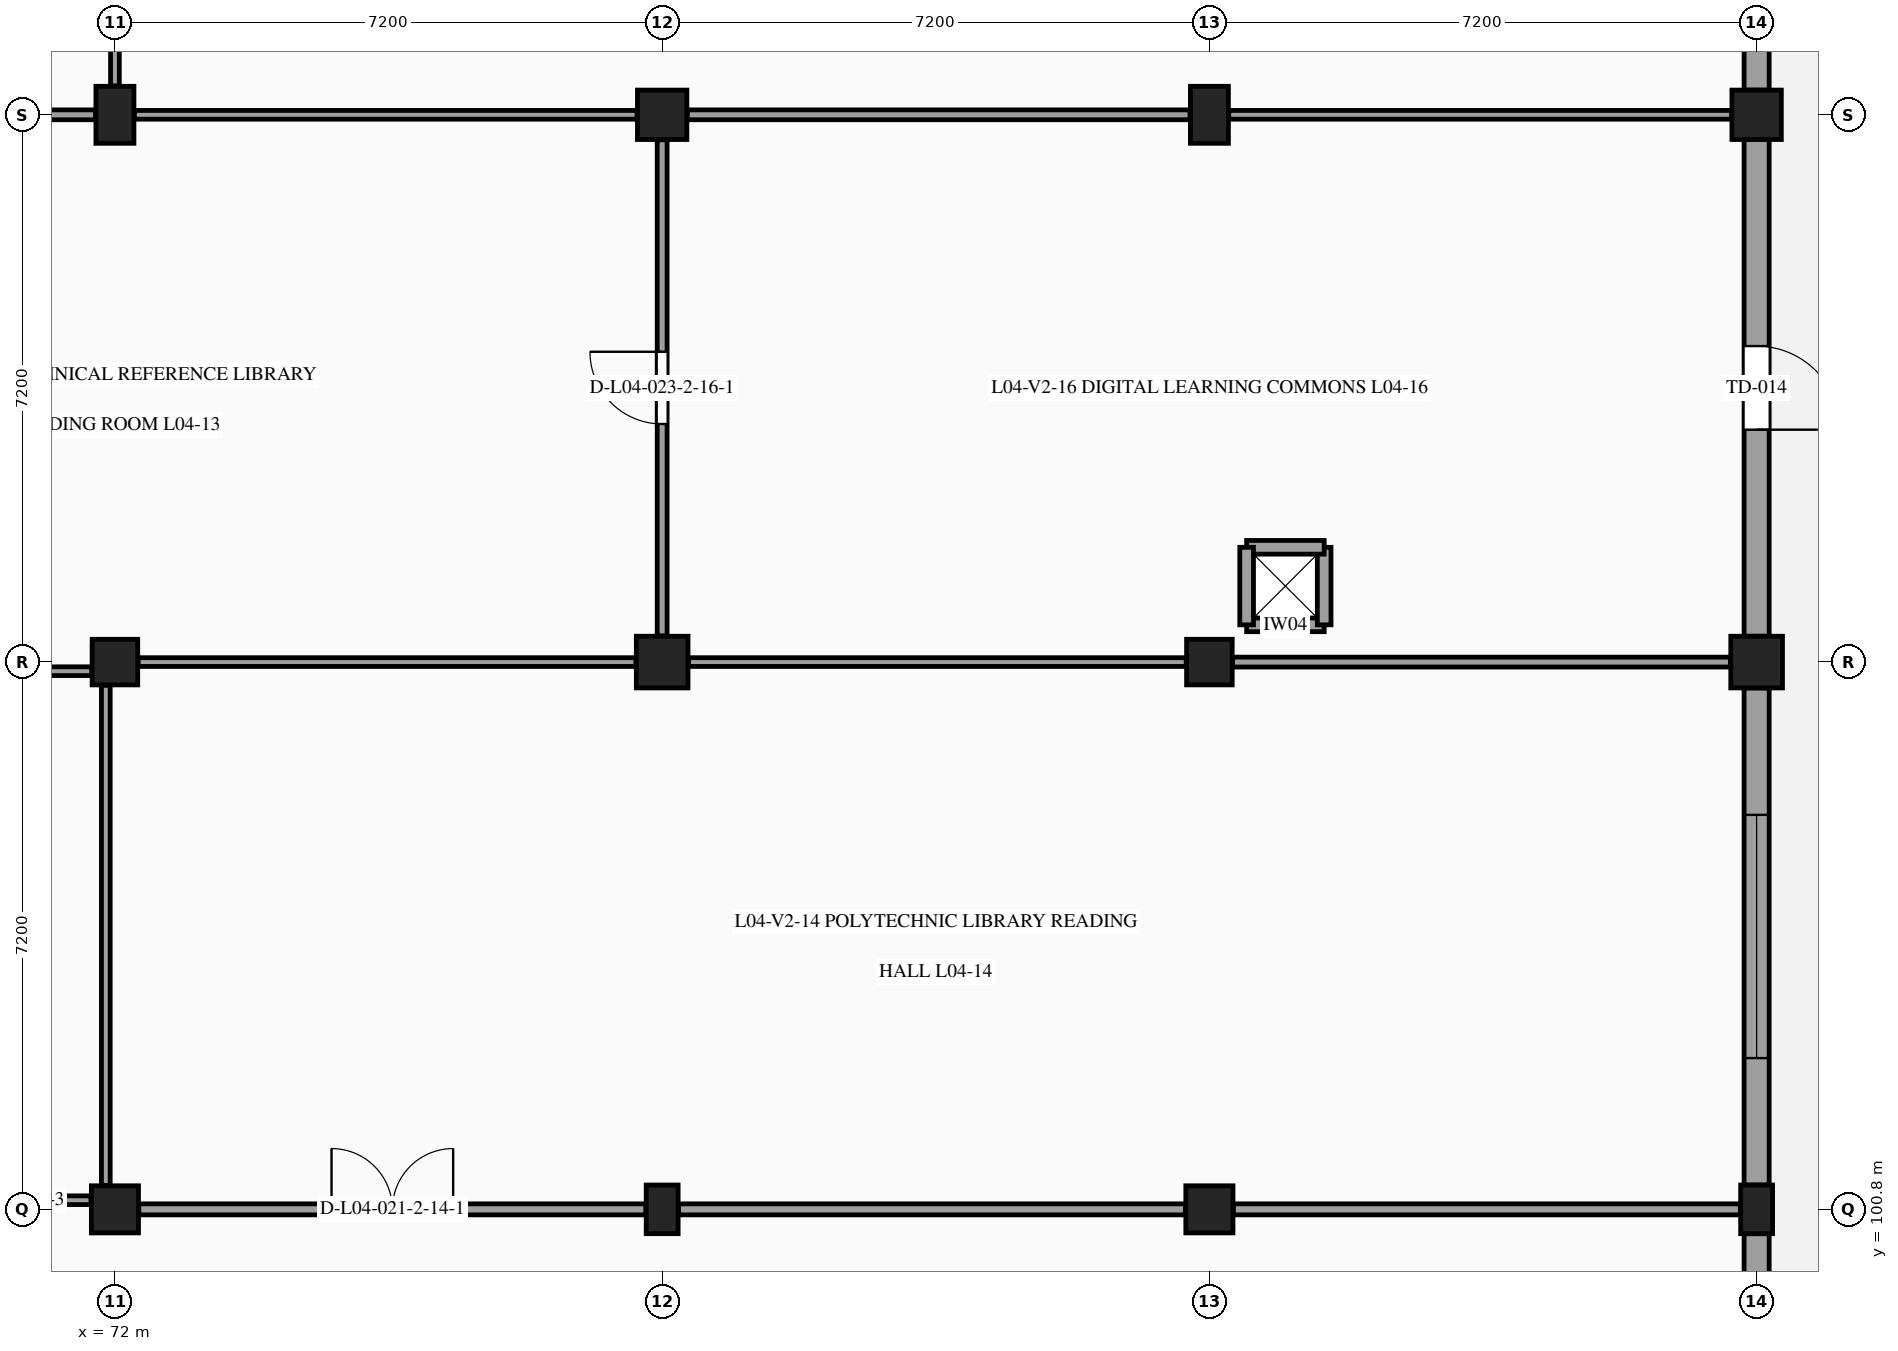
"""IFC4 building model, lengths in metres.
Left out: names, types, materials, properties, quantities, classifications, styles, units other than length and angle.
Written with IfcOpenShell. Run it as: python <this file> out.ifc"""

import sys

from ifc_helpers import new_model, si_unit, direction, frame, frame_2d, origin, origin_2d, place, context, subcontext, project, spatial, rectangle, extrude, element, fill, save


model = new_model("IFC4")
c1 = context("Model", 3, precision=1e-05, world=origin(), true_north=direction((0.0, 1.0)))
c2 = subcontext(c1, "Body", "Model", "MODEL_VIEW")
j1 = project(units=[si_unit("LENGTHUNIT", "METRE"), si_unit("PLANEANGLEUNIT", "RADIAN")], contexts=[c1])
p1 = place(None, origin())
s1 = spatial("IfcSite", under=j1, at=p1, CompositionType="ELEMENT")
p2 = place(p1, origin())
s2 = spatial("IfcBuilding", under=s1, at=p2, CompositionType="ELEMENT")
p3 = place(p2, frame((0.0, 0.0, 18.6)))
s3 = spatial("IfcBuildingStorey", under=s2, at=p3, CompositionType="ELEMENT", Elevation=18.6)
p4 = place(p3, frame((72.0, 100.8, 0.0), z_axis=(0.0, 0.0, 1.0), x_axis=(1.0, 0.0, 0.0)))
e1 = element("IfcColumn", 1, at=p4, inside=s3, PredefinedType="COLUMN", context=c2, shape_type="SweptSolid", body=[
    extrude(rectangle(XDim=0.62, YDim=0.62, at=origin_2d()), origin(), (0.0, 0.0, 1.0), 4.2),
])
p5 = place(p3, frame((72.0, 108.0, 0.0), z_axis=(0.0, 0.0, 1.0), x_axis=(1.0, 0.0, 0.0)))
e2 = element("IfcColumn", 2, at=p5, inside=s3, PredefinedType="COLUMN", context=c2, shape_type="SweptSolid", body=[
    extrude(rectangle(XDim=0.6, YDim=0.6, at=origin_2d()), origin(), (0.0, 0.0, 1.0), 4.2),
])
p6 = place(p3, frame((72.0, 115.2, 0.0), z_axis=(0.0, 0.0, 1.0), x_axis=(1.0, 0.0, 0.0)))
e3 = element("IfcColumn", 3, at=p6, inside=s3, PredefinedType="COLUMN", context=c2, shape_type="SweptSolid", body=[
    extrude(rectangle(XDim=0.5, YDim=0.75, at=origin_2d()), origin(), (0.0, 0.0, 1.0), 4.2),
])
p7 = place(p3, frame((79.2, 100.8, 0.0), z_axis=(0.0, 0.0, 1.0), x_axis=(1.0, 0.0, 0.0)))
e4 = element("IfcColumn", 4, at=p7, inside=s3, PredefinedType="PILASTER", context=c2, shape_type="SweptSolid", body=[
    extrude(rectangle(XDim=0.42, YDim=0.64, at=origin_2d()), origin(), (0.0, 0.0, 1.0), 4.2),
])
p8 = place(p3, frame((79.2, 108.0, 0.0), z_axis=(0.0, 0.0, 1.0), x_axis=(1.0, 0.0, 0.0)))
e5 = element("IfcColumn", 5, at=p8, inside=s3, PredefinedType="COLUMN", context=c2, shape_type="SweptSolid", body=[
    extrude(rectangle(XDim=0.68, YDim=0.68, at=origin_2d()), origin(), (0.0, 0.0, 1.0), 4.2),
])
p9 = place(p3, frame((79.2, 115.2, 0.0), z_axis=(0.0, 0.0, 1.0), x_axis=(1.0, 0.0, 0.0)))
e6 = element("IfcColumn", 6, at=p9, inside=s3, PredefinedType="COLUMN", context=c2, shape_type="SweptSolid", body=[
    extrude(rectangle(XDim=0.65, YDim=0.65, at=origin_2d()), origin(), (0.0, 0.0, 1.0), 4.2),
])
p10 = place(p3, frame((86.4, 100.8, 0.0), z_axis=(0.0, 0.0, 1.0), x_axis=(1.0, 0.0, 0.0)))
e7 = element("IfcColumn", 7, at=p10, inside=s3, PredefinedType="COLUMN", context=c2, shape_type="SweptSolid", body=[
    extrude(rectangle(XDim=0.62, YDim=0.62, at=origin_2d()), origin(), (0.0, 0.0, 1.0), 4.2),
])
p11 = place(p3, frame((86.4, 108.0, 0.0), z_axis=(0.0, 0.0, 1.0), x_axis=(1.0, 0.0, 0.0)))
e8 = element("IfcColumn", 8, at=p11, inside=s3, PredefinedType="COLUMN", context=c2, shape_type="SweptSolid", body=[
    extrude(rectangle(XDim=0.6, YDim=0.6, at=origin_2d()), origin(), (0.0, 0.0, 1.0), 4.2),
])
p12 = place(p3, frame((86.4, 115.2, 0.0), z_axis=(0.0, 0.0, 1.0), x_axis=(1.0, 0.0, 0.0)))
e9 = element("IfcColumn", 9, at=p12, inside=s3, PredefinedType="COLUMN", context=c2, shape_type="SweptSolid", body=[
    extrude(rectangle(XDim=0.5, YDim=0.75, at=origin_2d()), origin(), (0.0, 0.0, 1.0), 4.2),
])
p13 = place(p3, frame((93.6, 100.8, 0.0), z_axis=(0.0, 0.0, 1.0), x_axis=(1.0, 0.0, 0.0)))
e10 = element("IfcColumn", 10, at=p13, inside=s3, PredefinedType="PILASTER", context=c2, shape_type="SweptSolid", body=[
    extrude(rectangle(XDim=0.42, YDim=0.64, at=origin_2d()), origin(), (0.0, 0.0, 1.0), 4.2),
])
p14 = place(p3, frame((93.6, 108.0, 0.0), z_axis=(0.0, 0.0, 1.0), x_axis=(1.0, 0.0, 0.0)))
e11 = element("IfcColumn", 11, at=p14, inside=s3, PredefinedType="COLUMN", context=c2, shape_type="SweptSolid", body=[
    extrude(rectangle(XDim=0.68, YDim=0.68, at=origin_2d()), origin(), (0.0, 0.0, 1.0), 4.2),
])
p15 = place(p3, frame((93.6, 115.2, 0.0), z_axis=(0.0, 0.0, 1.0), x_axis=(1.0, 0.0, 0.0)))
e12 = element("IfcColumn", 12, at=p15, inside=s3, PredefinedType="COLUMN", context=c2, shape_type="SweptSolid", body=[
    extrude(rectangle(XDim=0.65, YDim=0.65, at=origin_2d()), origin(), (0.0, 0.0, 1.0), 4.2),
])
p16 = place(p3, frame((93.6, 122.09, 0.0), z_axis=(0.0, 0.0, 1.0), x_axis=(0.0, -1.0, 0.0)))
e13 = element("IfcWall", 13, at=p16, inside=s3, PredefinedType="STANDARD", context=c2, shape_type="SweptSolid", body=[
    extrude(rectangle(XDim=6.565, YDim=0.33, at=frame_2d((3.283, 0.0))), origin(), (0.0, 0.0, 1.0), 3.13),
])
p17 = place(p16, frame((2.583, 0.0, 0.0)))
e14 = element("IfcOpeningElement", 14, at=p17, cuts=e13, PredefinedType="OPENING", context=c2, shape_type="SweptSolid", body=[
    extrude(rectangle(XDim=1.4, YDim=2.25, at=frame_2d((0.7, 1.125))), frame((0.0, 0.175, 0.0), z_axis=(0.0, -1.0, 0.0), x_axis=(1.0, 0.0, 0.0)), (0.0, 0.0, 1.0), 0.35),
])
p18 = place(p3, frame((93.6, 114.875, 0.0), z_axis=(0.0, 0.0, 1.0), x_axis=(0.0, -1.0, 0.0)))
e15 = element("IfcWall", 15, at=p18, inside=s3, PredefinedType="STANDARD", context=c2, shape_type="SweptSolid", body=[
    extrude(rectangle(XDim=6.535, YDim=0.33, at=frame_2d((3.268, 0.0))), origin(), (0.0, 0.0, 1.0), 3.13),
])
p19 = place(p18, frame((2.718, 0.0, 0.0)))
e16 = element("IfcOpeningElement", 16, at=p19, cuts=e15, PredefinedType="OPENING", context=c2, shape_type="SweptSolid", body=[
    extrude(rectangle(XDim=1.1, YDim=2.2, at=frame_2d((0.55, 1.1))), frame((0.0, 0.175, 0.0), z_axis=(0.0, -1.0, 0.0), x_axis=(1.0, 0.0, 0.0)), (0.0, 0.0, 1.0), 0.35),
])
p20 = place(p3, frame((93.6, 107.66, 0.0), z_axis=(0.0, 0.0, 1.0), x_axis=(0.0, -1.0, 0.0)))
e17 = element("IfcWall", 17, at=p20, inside=s3, PredefinedType="STANDARD", context=c2, shape_type="SweptSolid", body=[
    extrude(rectangle(XDim=6.54, YDim=0.33, at=frame_2d((3.27, 0.0))), origin(), (0.0, 0.0, 1.0), 3.13),
])
p21 = place(p20, frame((1.67, 0.0, 0.95)))
e18 = element("IfcOpeningElement", 18, at=p21, cuts=e17, PredefinedType="OPENING", context=c2, shape_type="SweptSolid", body=[
    extrude(rectangle(XDim=3.2, YDim=1.45, at=frame_2d((1.6, 0.725))), frame((0.0, 0.175, 0.0), z_axis=(0.0, -1.0, 0.0), x_axis=(1.0, 0.0, 0.0)), (0.0, 0.0, 1.0), 0.35),
])
p22 = place(p3, frame((93.6, 100.48, 0.0), z_axis=(0.0, 0.0, 1.0), x_axis=(0.0, -1.0, 0.0)))
e19 = element("IfcWall", 19, at=p22, inside=s3, PredefinedType="STANDARD", context=c2, shape_type="SweptSolid", body=[
    extrude(rectangle(XDim=6.505, YDim=0.33, at=frame_2d((3.252, 0.0))), origin(), (0.0, 0.0, 1.0), 3.13),
])
p23 = place(p22, frame((1.653, 0.0, 0.95)))
e20 = element("IfcOpeningElement", 20, at=p23, cuts=e19, PredefinedType="OPENING", context=c2, shape_type="SweptSolid", body=[
    extrude(rectangle(XDim=3.2, YDim=1.45, at=frame_2d((1.6, 0.725))), frame((0.0, 0.175, 0.0), z_axis=(0.0, -1.0, 0.0), x_axis=(1.0, 0.0, 0.0)), (0.0, 0.0, 1.0), 0.35),
])
p24 = place(p3, frame((65.015, 100.92, 0.0), z_axis=(0.0, 0.0, 1.0), x_axis=(1.0, 0.0, 0.0)))
e21 = element("IfcWall", 21, at=p24, inside=s3, PredefinedType="PARTITIONING", context=c2, shape_type="SweptSolid", body=[
    extrude(rectangle(XDim=6.67, YDim=0.115, at=frame_2d((3.335, 0.0))), origin(), (0.0, 0.0, 1.0), 3.23),
])
p25 = place(p24, frame((0.785, 0.0, 0.0)))
e22 = element("IfcOpeningElement", 22, at=p25, cuts=e21, PredefinedType="OPENING", context=c2, shape_type="SweptSolid", body=[
    extrude(rectangle(XDim=0.95, YDim=2.1, at=frame_2d((0.475, 1.05))), frame((0.0, 0.067, 0.0), z_axis=(0.0, -1.0, 0.0), x_axis=(1.0, 0.0, 0.0)), (0.0, 0.0, 1.0), 0.135),
])
p26 = place(p24, frame((2.885, 0.0, 0.0)))
e23 = element("IfcOpeningElement", 23, at=p26, cuts=e21, PredefinedType="OPENING", context=c2, shape_type="SweptSolid", body=[
    extrude(rectangle(XDim=0.95, YDim=2.1, at=frame_2d((0.475, 1.05))), frame((0.0, 0.067, 0.0), z_axis=(0.0, -1.0, 0.0), x_axis=(1.0, 0.0, 0.0)), (0.0, 0.0, 1.0), 0.135),
])
p27 = place(p24, frame((5.035, 0.0, 0.0)))
e24 = element("IfcOpeningElement", 24, at=p27, cuts=e21, PredefinedType="OPENING", context=c2, shape_type="SweptSolid", body=[
    extrude(rectangle(XDim=1.0, YDim=2.15, at=frame_2d((0.5, 1.075))), frame((0.0, 0.067, 0.0), z_axis=(0.0, -1.0, 0.0), x_axis=(1.0, 0.0, 0.0)), (0.0, 0.0, 1.0), 0.135),
])
p28 = place(p3, frame((65.145, 107.88, 0.0), z_axis=(0.0, 0.0, 1.0), x_axis=(1.0, 0.0, 0.0)))
e25 = element("IfcWall", 25, at=p28, inside=s3, PredefinedType="PARTITIONING", context=c2, shape_type="SweptSolid", body=[
    extrude(rectangle(XDim=6.55, YDim=0.115, at=frame_2d((3.275, 0.0))), origin(), (0.0, 0.0, 1.0), 3.23),
])
p29 = place(p3, frame((71.88, 101.115, 0.0), z_axis=(0.0, 0.0, 1.0), x_axis=(0.0, 1.0, 0.0)))
e26 = element("IfcWall", 26, at=p29, inside=s3, PredefinedType="PARTITIONING", context=c2, shape_type="SweptSolid", body=[
    extrude(rectangle(XDim=6.58, YDim=0.115, at=frame_2d((3.29, 0.0))), origin(), (0.0, 0.0, 1.0), 3.24),
])
for number, where, z_axis, x_axis in (
    (27, (86.89, 108.49, 0.0), (0.0, 0.0, 1.0), (1.0, 0.0, 0.0)),
    (28, (87.91, 108.49, 0.0), (0.0, 0.0, 1.0), (0.0, 1.0, 0.0)),
    (29, (87.91, 109.51, 0.0), (0.0, 0.0, 1.0), (-1.0, 0.0, 0.0)),
    (30, (86.89, 109.51, 0.0), (0.0, 0.0, 1.0), (0.0, -1.0, 0.0)),
):
    element("IfcWall", number, at=place(p3, frame(where, z_axis=z_axis, x_axis=x_axis)), inside=s3, PredefinedType="PARTITIONING", context=c2, shape_type="SweptSolid", body=[
        extrude(rectangle(XDim=1.02, YDim=0.18, at=frame_2d((0.51, 0.0))), origin(), (0.0, 0.0, 1.0), 3.955),
    ])
p30 = place(p3, frame((65.13, 115.2, 0.0), z_axis=(0.0, 0.0, 1.0), x_axis=(1.0, 0.0, 0.0)))
e31 = element("IfcWall", 31, at=p30, inside=s3, PredefinedType="PARTITIONING", context=c2, shape_type="SweptSolid", body=[
    extrude(rectangle(XDim=6.615, YDim=0.13, at=frame_2d((3.308, 0.0))), origin(), (0.0, 0.0, 1.0), 3.23),
])
p31 = place(p3, frame((72.0, 115.58, 0.0), z_axis=(0.0, 0.0, 1.0), x_axis=(0.0, 1.0, 0.0)))
e32 = element("IfcWall", 32, at=p31, inside=s3, PredefinedType="PARTITIONING", context=c2, shape_type="SweptSolid", body=[
    extrude(rectangle(XDim=6.495, YDim=0.115, at=frame_2d((3.248, 0.0))), origin(), (0.0, 0.0, 1.0), 3.305),
])
p32 = place(p31, frame((2.448, 0.0, 0.0)))
e33 = element("IfcOpeningElement", 33, at=p32, cuts=e32, PredefinedType="OPENING", context=c2, shape_type="SweptSolid", body=[
    extrude(rectangle(XDim=1.6, YDim=2.2, at=frame_2d((0.8, 1.1))), frame((0.0, 0.067, 0.0), z_axis=(0.0, -1.0, 0.0), x_axis=(1.0, 0.0, 0.0)), (0.0, 0.0, 1.0), 0.135),
])
p33 = place(p3, frame((72.315, 100.8, 0.0), z_axis=(0.0, 0.0, 1.0), x_axis=(1.0, 0.0, 0.0)))
e34 = element("IfcWall", 34, at=p33, inside=s3, PredefinedType="PARTITIONING", context=c2, shape_type="SweptSolid", body=[
    extrude(rectangle(XDim=6.67, YDim=0.145, at=frame_2d((3.335, 0.0))), origin(), (0.0, 0.0, 1.0), 3.215),
])
p34 = place(p33, frame((2.535, 0.0, 0.0)))
e35 = element("IfcOpeningElement", 35, at=p34, cuts=e34, PredefinedType="OPENING", context=c2, shape_type="SweptSolid", body=[
    extrude(rectangle(XDim=1.6, YDim=2.2, at=frame_2d((0.8, 1.1))), frame((0.0, 0.083, 0.0), z_axis=(0.0, -1.0, 0.0), x_axis=(1.0, 0.0, 0.0)), (0.0, 0.0, 1.0), 0.165),
])
p35 = place(p3, frame((72.305, 108.0, 0.0), z_axis=(0.0, 0.0, 1.0), x_axis=(1.0, 0.0, 0.0)))
e36 = element("IfcWall", 36, at=p35, inside=s3, PredefinedType="PARTITIONING", context=c2, shape_type="SweptSolid", body=[
    extrude(rectangle(XDim=6.55, YDim=0.115, at=frame_2d((3.275, 0.0))), origin(), (0.0, 0.0, 1.0), 3.215),
])
p36 = place(p3, frame((79.2, 108.345, 0.0), z_axis=(0.0, 0.0, 1.0), x_axis=(0.0, 1.0, 0.0)))
e37 = element("IfcWall", 37, at=p36, inside=s3, PredefinedType="PARTITIONING", context=c2, shape_type="SweptSolid", body=[
    extrude(rectangle(XDim=6.525, YDim=0.13, at=frame_2d((3.263, 0.0))), origin(), (0.0, 0.0, 1.0), 3.24),
])
p37 = place(p36, frame((2.788, 0.0, 0.0)))
e38 = element("IfcOpeningElement", 38, at=p37, cuts=e37, PredefinedType="OPENING", context=c2, shape_type="SweptSolid", body=[
    extrude(rectangle(XDim=0.95, YDim=2.15, at=frame_2d((0.475, 1.075))), frame((0.0, 0.075, 0.0), z_axis=(0.0, -1.0, 0.0), x_axis=(1.0, 0.0, 0.0)), (0.0, 0.0, 1.0), 0.15),
])
p38 = place(p3, frame((72.255, 115.2, 0.0), z_axis=(0.0, 0.0, 1.0), x_axis=(1.0, 0.0, 0.0)))
e39 = element("IfcWall", 39, at=p38, inside=s3, PredefinedType="PARTITIONING", context=c2, shape_type="SweptSolid", body=[
    extrude(rectangle(XDim=6.615, YDim=0.115, at=frame_2d((3.308, 0.0))), origin(), (0.0, 0.0, 1.0), 3.215),
])
p39 = place(p3, frame((79.415, 100.8, 0.0), z_axis=(0.0, 0.0, 1.0), x_axis=(1.0, 0.0, 0.0)))
e40 = element("IfcWall", 40, at=p39, inside=s3, PredefinedType="PARTITIONING", context=c2, shape_type="SweptSolid", body=[
    extrude(rectangle(XDim=6.67, YDim=0.145, at=frame_2d((3.335, 0.0))), origin(), (0.0, 0.0, 1.0), 3.235),
])
p40 = place(p3, frame((79.545, 108.0, 0.0), z_axis=(0.0, 0.0, 1.0), x_axis=(1.0, 0.0, 0.0)))
e41 = element("IfcWall", 41, at=p40, inside=s3, PredefinedType="PARTITIONING", context=c2, shape_type="SweptSolid", body=[
    extrude(rectangle(XDim=6.55, YDim=0.115, at=frame_2d((3.275, 0.0))), origin(), (0.0, 0.0, 1.0), 3.235),
])
p41 = place(p3, frame((79.53, 115.2, 0.0), z_axis=(0.0, 0.0, 1.0), x_axis=(1.0, 0.0, 0.0)))
e42 = element("IfcWall", 42, at=p41, inside=s3, PredefinedType="PARTITIONING", context=c2, shape_type="SweptSolid", body=[
    extrude(rectangle(XDim=6.615, YDim=0.13, at=frame_2d((3.308, 0.0))), origin(), (0.0, 0.0, 1.0), 3.235),
])
p42 = place(p3, frame((86.715, 100.8, 0.0), z_axis=(0.0, 0.0, 1.0), x_axis=(1.0, 0.0, 0.0)))
e43 = element("IfcWall", 43, at=p42, inside=s3, PredefinedType="PARTITIONING", context=c2, shape_type="SweptSolid", body=[
    extrude(rectangle(XDim=6.67, YDim=0.145, at=frame_2d((3.335, 0.0))), origin(), (0.0, 0.0, 1.0), 3.275),
])
p43 = place(p3, frame((86.705, 108.0, 0.0), z_axis=(0.0, 0.0, 1.0), x_axis=(1.0, 0.0, 0.0)))
e44 = element("IfcWall", 44, at=p43, inside=s3, PredefinedType="PARTITIONING", context=c2, shape_type="SweptSolid", body=[
    extrude(rectangle(XDim=6.55, YDim=0.13, at=frame_2d((3.275, 0.0))), origin(), (0.0, 0.0, 1.0), 3.275),
])
p44 = place(p3, frame((86.655, 115.2, 0.0), z_axis=(0.0, 0.0, 1.0), x_axis=(1.0, 0.0, 0.0)))
e45 = element("IfcWall", 45, at=p44, inside=s3, PredefinedType="PARTITIONING", context=c2, shape_type="SweptSolid", body=[
    extrude(rectangle(XDim=6.615, YDim=0.115, at=frame_2d((3.308, 0.0))), origin(), (0.0, 0.0, 1.0), 3.275),
])
p45 = place(p19, origin())
e46 = element("IfcDoor", 46, at=p45, inside=s3, OperationType="SINGLE_SWING_RIGHT", PredefinedType="DOOR", context=c2, shape_type="SweptSolid", body=[
    extrude(rectangle(XDim=1.1, YDim=2.2, at=frame_2d((0.55, 1.1))), frame((0.0, 0.025, 0.0), z_axis=(0.0, -1.0, 0.0), x_axis=(1.0, 0.0, 0.0)), (0.0, 0.0, 1.0), 0.05),
])
fill(e16, e46)
p46 = place(p21, origin())
e47 = element("IfcWindow", 47, at=p46, inside=s3, PartitioningType="SINGLE_PANEL", PredefinedType="WINDOW", context=c2, shape_type="SweptSolid", body=[
    extrude(rectangle(XDim=3.2, YDim=1.45, at=frame_2d((1.6, 0.725))), frame((0.0, 0.03, 0.0), z_axis=(0.0, -1.0, 0.0), x_axis=(1.0, 0.0, 0.0)), (0.0, 0.0, 1.0), 0.06),
])
fill(e18, e47)
p47 = place(p34, origin())
e48 = element("IfcDoor", 48, at=p47, inside=s3, OperationType="DOUBLE_DOOR_SINGLE_SWING", PredefinedType="DOOR", context=c2, shape_type="SweptSolid", body=[
    extrude(rectangle(XDim=1.6, YDim=2.2, at=frame_2d((0.8, 1.1))), frame((0.0, 0.025, 0.0), z_axis=(0.0, -1.0, 0.0), x_axis=(1.0, 0.0, 0.0)), (0.0, 0.0, 1.0), 0.05),
])
fill(e35, e48)
p48 = place(p37, origin())
e49 = element("IfcDoor", 49, at=p48, inside=s3, OperationType="SINGLE_SWING_RIGHT", PredefinedType="DOOR", context=c2, shape_type="SweptSolid", body=[
    extrude(rectangle(XDim=0.95, YDim=2.15, at=frame_2d((0.475, 1.075))), frame((0.0, 0.025, 0.0), z_axis=(0.0, -1.0, 0.0), x_axis=(1.0, 0.0, 0.0)), (0.0, 0.0, 1.0), 0.05),
])
fill(e38, e49)
save(model, sys.argv[1])
